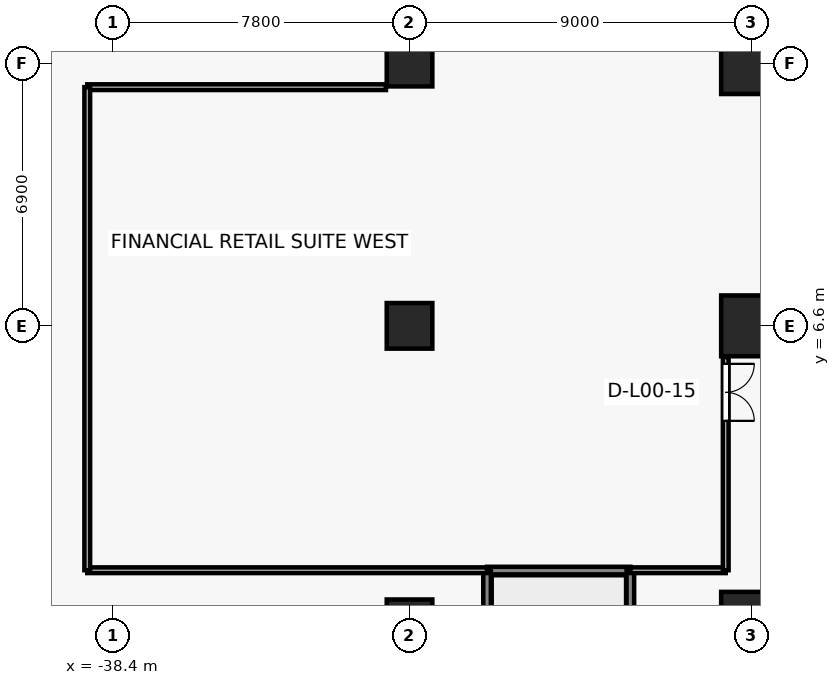
"""IFC4 building model, lengths in metres.
Left out: names, types, materials, properties, quantities, classifications, styles, units other than length and angle.
Written with IfcOpenShell. Run it as: python <this file> out.ifc"""

import sys

from ifc_helpers import new_model, si_unit, direction, frame, frame_2d, origin, origin_2d, place, context, subcontext, project, spatial, rectangle, extrude, source, transform, mapped, element, fill, save


model = new_model("IFC4")
c1 = context("Model", 3, precision=1e-05, world=origin(), true_north=direction((0.0, 1.0)))
c2 = subcontext(c1, "Body", "Model", "MODEL_VIEW")
j1 = project(units=[si_unit("LENGTHUNIT", "METRE"), si_unit("PLANEANGLEUNIT", "RADIAN")], contexts=[c1])
p1 = place(None, origin())
s1 = spatial("IfcSite", under=j1, at=p1, CompositionType="ELEMENT")
p2 = place(p1, origin())
s2 = spatial("IfcBuilding", under=s1, at=p2, CompositionType="ELEMENT")
p3 = place(p2, origin())
s3 = spatial("IfcBuildingStorey", under=s2, at=p3, CompositionType="ELEMENT", Elevation=0.0)
for number, where, z_axis, x_axis in (
    (1, (-21.6, -1.2, 0.0), (0.0, 0.0, 1.0), (1.0, 0.0, 0.0)),
    (2, (-21.6, 6.6, 0.0), (0.0, 0.0, 1.0), (1.0, 0.0, 0.0)),
    (3, (-21.6, 13.5, 0.0), (0.0, 0.0, 1.0), (1.0, 0.0, 0.0)),
):
    element("IfcColumn", number, at=place(p3, frame(where, z_axis=z_axis, x_axis=x_axis)), inside=s3, PredefinedType="COLUMN", context=c2, shape_type="SweptSolid", body=[
        extrude(rectangle(XDim=1.6, YDim=1.6, at=origin_2d()), origin(), (0.0, 0.0, 1.0), 5.0),
    ])
for number, where, z_axis, x_axis in (
    (4, (-30.6, -1.2, 0.0), (0.0, 0.0, 1.0), (1.0, 0.0, 0.0)),
    (5, (-30.6, 6.6, 0.0), (0.0, 0.0, 1.0), (1.0, 0.0, 0.0)),
    (6, (-30.6, 13.5, 0.0), (0.0, 0.0, 1.0), (1.0, 0.0, 0.0)),
):
    element("IfcColumn", number, at=place(p3, frame(where, z_axis=z_axis, x_axis=x_axis)), inside=s3, PredefinedType="COLUMN", context=c2, shape_type="SweptSolid", body=[
        extrude(rectangle(XDim=1.2, YDim=1.2, at=origin_2d()), origin(), (0.0, 0.0, 1.0), 5.0),
    ])
p4 = place(p3, frame((-28.56, 0.16, 0.0), z_axis=(0.0, 0.0, 1.0), x_axis=(1.0, 0.0, 0.0)))
e7 = element("IfcWall", 7, at=p4, inside=s3, PredefinedType="SOLIDWALL", context=c2, shape_type="SweptSolid", body=[
    extrude(rectangle(XDim=3.77, YDim=0.2, at=frame_2d((1.885, 0.0))), origin(), (0.0, 0.0, 1.0), 4.7),
])
for number, where, z_axis, x_axis in (
    (8, (-28.56, -8.76, 0.0), (0.0, 0.0, 1.0), (0.0, 1.0, 0.0)),
    (9, (-24.79, 0.16, 0.0), (0.0, 0.0, 1.0), (0.0, -1.0, 0.0)),
):
    element("IfcWall", number, at=place(p3, frame(where, z_axis=z_axis, x_axis=x_axis)), inside=s3, PredefinedType="SOLIDWALL", context=c2, shape_type="SweptSolid", body=[
        extrude(rectangle(XDim=8.92, YDim=0.2, at=frame_2d((4.46, 0.0))), origin(), (0.0, 0.0, 1.0), 4.7),
    ])
p5 = place(p3, frame((-28.56, 0.17, 0.0), z_axis=(0.0, 0.0, 1.0), x_axis=(-1.0, 0.0, 0.0)))
e10 = element("IfcWall", 10, at=p5, inside=s3, PredefinedType="PARTITIONING", context=c2, shape_type="SweptSolid", body=[
    extrude(rectangle(XDim=10.52, YDim=0.15, at=frame_2d((5.26, 0.0))), origin(), (0.0, 0.0, 1.0), 3.79),
])
p6 = place(p3, frame((-22.28, 0.17, 0.0), z_axis=(0.0, 0.0, 1.0), x_axis=(-1.0, 0.0, 0.0)))
e11 = element("IfcWall", 11, at=p6, inside=s3, PredefinedType="PARTITIONING", context=c2, shape_type="SweptSolid", body=[
    extrude(rectangle(XDim=2.51, YDim=0.15, at=frame_2d((1.255, 0.0))), origin(), (0.0, 0.0, 1.0), 4.7),
])
p7 = place(p3, frame((-39.08, 12.88, 0.0), z_axis=(0.0, 0.0, 1.0), x_axis=(1.0, 0.0, 0.0)))
e12 = element("IfcWall", 12, at=p7, inside=s3, PredefinedType="PARTITIONING", context=c2, shape_type="SweptSolid", body=[
    extrude(rectangle(XDim=7.86, YDim=0.15, at=frame_2d((3.93, 0.0))), origin(), (0.0, 0.0, 1.0), 4.7),
])
p8 = place(p3, frame((-39.08, 0.17, 0.0), z_axis=(0.0, 0.0, 1.0), x_axis=(0.0, 1.0, 0.0)))
e13 = element("IfcWall", 13, at=p8, inside=s3, PredefinedType="PARTITIONING", context=c2, shape_type="SweptSolid", body=[
    extrude(rectangle(XDim=12.71, YDim=0.15, at=frame_2d((6.355, 0.0))), origin(), (0.0, 0.0, 1.0), 4.7),
])
p9 = place(p3, frame((-22.28, 5.78, 0.0), z_axis=(0.0, 0.0, 1.0), x_axis=(0.0, -1.0, 0.0)))
e14 = element("IfcWall", 14, at=p9, inside=s3, PredefinedType="PARTITIONING", context=c2, shape_type="SweptSolid", body=[
    extrude(rectangle(XDim=5.61, YDim=0.15, at=frame_2d((2.805, 0.0))), origin(), (0.0, 0.0, 1.0), 4.073),
])
p10 = place(p9, frame((0.18, 0.0, 0.0)))
e15 = element("IfcOpeningElement", 15, at=p10, cuts=e14, PredefinedType="OPENING", context=c2, shape_type="SweptSolid", body=[
    extrude(rectangle(XDim=1.5, YDim=2.2, at=frame_2d((0.75, 1.1))), frame((0.0, 0.085, 0.0), z_axis=(0.0, -1.0, 0.0), x_axis=(1.0, 0.0, 0.0)), (0.0, 0.0, 1.0), 0.17),
])
m1 = source(origin(), c2, "Body", "SweptSolid", [
    extrude(rectangle(XDim=1.5, YDim=2.2, at=frame_2d((0.75, 1.1))), frame((0.0, 0.025, 0.0), z_axis=(0.0, -1.0, 0.0), x_axis=(1.0, 0.0, 0.0)), (0.0, 0.0, 1.0), 0.05),
])
p11 = place(p10, origin())
e16 = element("IfcDoor", 16, at=p11, inside=s3, OperationType="DOUBLE_DOOR_SINGLE_SWING", PredefinedType="DOOR", context=c2, shape_type="MappedRepresentation", body=[
    mapped(m1, transform((0.0, 0.0, 0.0), x_axis=(1.0, 0.0, 0.0), y_axis=(0.0, 1.0, 0.0), z_axis=(0.0, 0.0, 1.0), scale=1.0)),
])
fill(e15, e16)
save(model, sys.argv[1])
